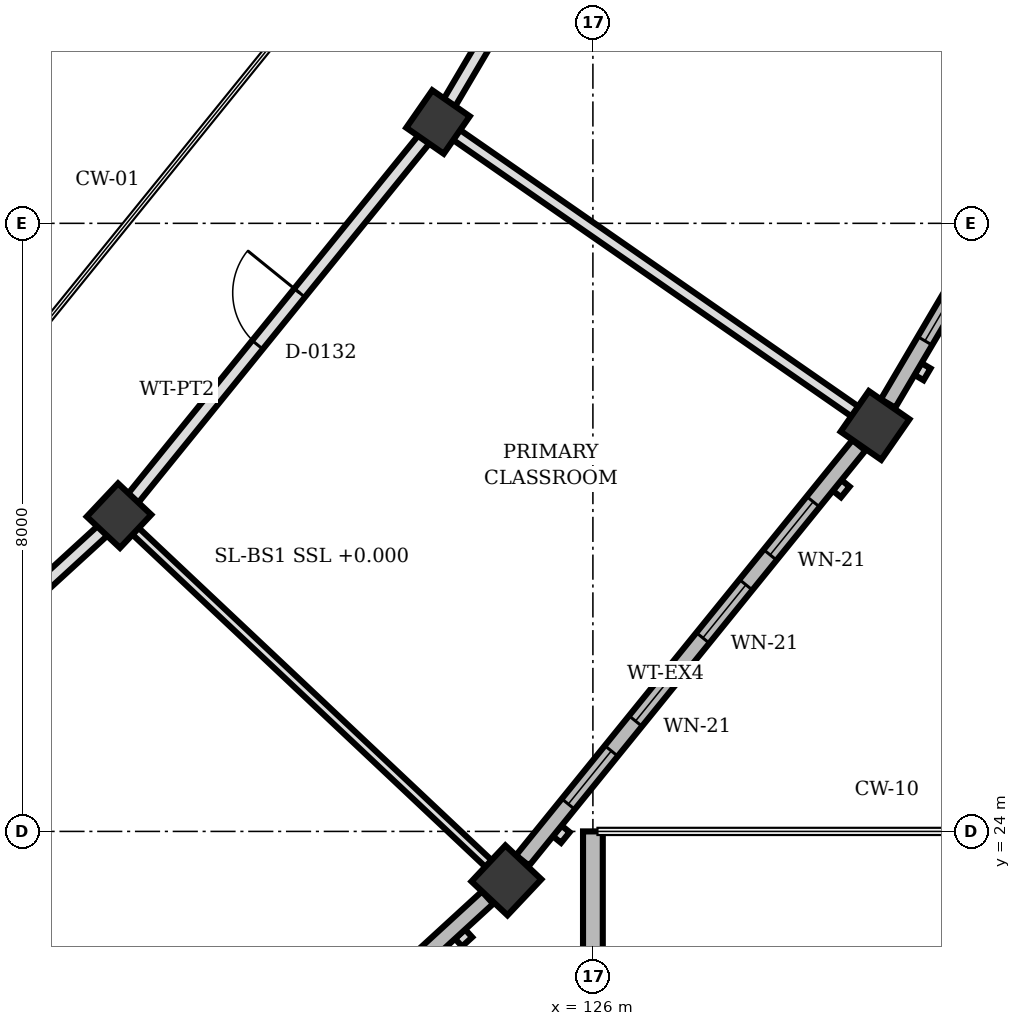
"""IFC4 building model, lengths in metres.
Left out: names, types, materials, properties, quantities, classifications, styles, units other than length and angle.
Written with IfcOpenShell. Run it as: python <this file> out.ifc"""

import sys

from ifc_helpers import new_model, si_unit, direction, frame, frame_2d, origin, origin_2d, place, context, subcontext, project, spatial, rectangle, extrude, element, fill, save


model = new_model("IFC4")
c1 = context("Model", 3, precision=1e-05, world=origin(), true_north=direction((0.0, 1.0)))
c2 = subcontext(c1, "Body", "Model", "MODEL_VIEW")
j1 = project(units=[si_unit("LENGTHUNIT", "METRE"), si_unit("PLANEANGLEUNIT", "RADIAN")], contexts=[c1])
p1 = place(None, origin())
s1 = spatial("IfcSite", under=j1, at=p1, CompositionType="ELEMENT")
p2 = place(p1, origin())
s2 = spatial("IfcBuilding", under=s1, at=p2, CompositionType="ELEMENT")
p3 = place(p2, origin())
s3 = spatial("IfcBuildingStorey", under=s2, at=p3, CompositionType="ELEMENT", Elevation=0.0)
for number, where, z_axis, x_axis in (
    (1, (119.765, 28.154, 0.0), (0.0, 0.0, 1.0), (0.728, -0.685, 0.0)),
    (2, (123.962, 33.333, 0.0), (0.0, 0.0, 1.0), (0.821, -0.57, 0.0)),
):
    element("IfcColumn", number, at=place(p3, frame(where, z_axis=z_axis, x_axis=x_axis)), inside=s3, PredefinedType="COLUMN", context=c2, shape_type="SweptSolid", body=[
        extrude(rectangle(XDim=0.6, YDim=0.6, at=origin_2d()), origin(), (0.0, 0.0, 1.0), 4.5),
    ])
for number, where, z_axis, x_axis in (
    (3, (124.862, 23.356, 0.0), (0.0, 0.0, 1.0), (0.728, -0.685, 0.0)),
    (4, (129.712, 29.341, 0.0), (0.0, 0.0, 1.0), (0.821, -0.57, 0.0)),
):
    element("IfcColumn", number, at=place(p3, frame(where, z_axis=z_axis, x_axis=x_axis)), inside=s3, PredefinedType="COLUMN", context=c2, shape_type="SweptSolid", body=[
        extrude(rectangle(XDim=0.65, YDim=0.65, at=origin_2d()), origin(), (0.0, 0.0, 1.0), 4.5),
    ])
p4 = place(p3, frame((124.614, 23.129, 0.0), z_axis=(0.0, 0.0, 1.0), x_axis=(-0.737497040912, -0.675350364364, 0.0)))
e5 = element("IfcWall", 5, at=p4, inside=s3, PredefinedType="SOLIDWALL", context=c2, shape_type="SweptSolid", body=[
    extrude(rectangle(XDim=7.032, YDim=0.22, at=frame_2d((3.516, 0.0))), origin(), (0.0, 0.0, 1.0), 3.55),
])
p5 = place(p4, frame((2.516, 0.0, 0.0)))
e6 = element("IfcOpeningElement", 6, at=p5, cuts=e5, PredefinedType="OPENING", context=c2, shape_type="SweptSolid", body=[
    extrude(rectangle(XDim=2.0, YDim=2.35, at=frame_2d((1.0, 1.175))), frame((0.0, 0.12, 0.0), z_axis=(0.0, -1.0, 0.0), x_axis=(1.0, 0.0, 0.0)), (0.0, 0.0, 1.0), 0.24),
])
p6 = place(p3, frame((129.5, 29.08, 0.0), z_axis=(0.0, 0.0, 1.0), x_axis=(-0.629497848331, -0.777002225831, 0.0)))
e7 = element("IfcWall", 7, at=p6, inside=s3, PredefinedType="SOLIDWALL", context=c2, shape_type="SweptSolid", body=[
    extrude(rectangle(XDim=7.031, YDim=0.22, at=frame_2d((3.516, 0.0))), origin(), (0.0, 0.0, 1.0), 3.55),
])
p7 = place(p6, frame((0.956, 0.0, 0.85)))
e8 = element("IfcOpeningElement", 8, at=p7, cuts=e7, PredefinedType="OPENING", context=c2, shape_type="SweptSolid", body=[
    extrude(rectangle(XDim=0.9, YDim=1.4, at=frame_2d((0.45, 0.7))), frame((0.0, 0.12, 0.0), z_axis=(0.0, -1.0, 0.0), x_axis=(1.0, 0.0, 0.0)), (0.0, 0.0, 1.0), 0.24),
])
p8 = place(p6, frame((2.362, 0.0, 0.85)))
e9 = element("IfcOpeningElement", 9, at=p8, cuts=e7, PredefinedType="OPENING", context=c2, shape_type="SweptSolid", body=[
    extrude(rectangle(XDim=0.9, YDim=1.4, at=frame_2d((0.45, 0.7))), frame((0.0, 0.12, 0.0), z_axis=(0.0, -1.0, 0.0), x_axis=(1.0, 0.0, 0.0)), (0.0, 0.0, 1.0), 0.24),
])
p9 = place(p6, frame((3.769, 0.0, 0.85)))
e10 = element("IfcOpeningElement", 10, at=p9, cuts=e7, PredefinedType="OPENING", context=c2, shape_type="SweptSolid", body=[
    extrude(rectangle(XDim=0.9, YDim=1.4, at=frame_2d((0.45, 0.7))), frame((0.0, 0.12, 0.0), z_axis=(0.0, -1.0, 0.0), x_axis=(1.0, 0.0, 0.0)), (0.0, 0.0, 1.0), 0.24),
])
p10 = place(p6, frame((5.175, 0.0, 0.85)))
e11 = element("IfcOpeningElement", 11, at=p10, cuts=e7, PredefinedType="OPENING", context=c2, shape_type="SweptSolid", body=[
    extrude(rectangle(XDim=0.9, YDim=1.4, at=frame_2d((0.45, 0.7))), frame((0.0, 0.12, 0.0), z_axis=(0.0, -1.0, 0.0), x_axis=(1.0, 0.0, 0.0)), (0.0, 0.0, 1.0), 0.24),
])
p11 = place(p3, frame((133.454, 35.688, 0.0), z_axis=(0.0, 0.0, 1.0), x_axis=(-0.50780734215, -0.861470663028, 0.0)))
e12 = element("IfcWall", 12, at=p11, inside=s3, PredefinedType="SOLIDWALL", context=c2, shape_type="SweptSolid", body=[
    extrude(rectangle(XDim=7.032, YDim=0.22, at=frame_2d((3.516, 0.0))), origin(), (0.0, 0.0, 1.0), 3.55),
])
p12 = place(p11, frame((0.956, 0.0, 0.85)))
e13 = element("IfcOpeningElement", 13, at=p12, cuts=e12, PredefinedType="OPENING", context=c2, shape_type="SweptSolid", body=[
    extrude(rectangle(XDim=0.9, YDim=1.4, at=frame_2d((0.45, 0.7))), frame((0.0, 0.12, 0.0), z_axis=(0.0, -1.0, 0.0), x_axis=(1.0, 0.0, 0.0)), (0.0, 0.0, 1.0), 0.24),
])
p13 = place(p11, frame((2.363, 0.0, 0.85)))
e14 = element("IfcOpeningElement", 14, at=p13, cuts=e12, PredefinedType="OPENING", context=c2, shape_type="SweptSolid", body=[
    extrude(rectangle(XDim=0.9, YDim=1.4, at=frame_2d((0.45, 0.7))), frame((0.0, 0.12, 0.0), z_axis=(0.0, -1.0, 0.0), x_axis=(1.0, 0.0, 0.0)), (0.0, 0.0, 1.0), 0.24),
])
p14 = place(p11, frame((3.769, 0.0, 0.85)))
e15 = element("IfcOpeningElement", 15, at=p14, cuts=e12, PredefinedType="OPENING", context=c2, shape_type="SweptSolid", body=[
    extrude(rectangle(XDim=0.9, YDim=1.4, at=frame_2d((0.45, 0.7))), frame((0.0, 0.12, 0.0), z_axis=(0.0, -1.0, 0.0), x_axis=(1.0, 0.0, 0.0)), (0.0, 0.0, 1.0), 0.24),
])
p15 = place(p11, frame((5.176, 0.0, 0.85)))
e16 = element("IfcOpeningElement", 16, at=p15, cuts=e12, PredefinedType="OPENING", context=c2, shape_type="SweptSolid", body=[
    extrude(rectangle(XDim=0.9, YDim=1.4, at=frame_2d((0.45, 0.7))), frame((0.0, 0.12, 0.0), z_axis=(0.0, -1.0, 0.0), x_axis=(1.0, 0.0, 0.0)), (0.0, 0.0, 1.0), 0.24),
])
p16 = place(p3, frame((126.0, 16.327, 0.0), z_axis=(0.0, 0.0, 1.0), x_axis=(0.0, 1.0, 0.0)))
e17 = element("IfcWall", 17, at=p16, inside=s3, PredefinedType="SOLIDWALL", context=c2, shape_type="SweptSolid", body=[
    extrude(rectangle(XDim=7.673, YDim=0.26, at=frame_2d((3.836, 0.0))), origin(), (0.0, 0.0, 1.0), 3.55),
])
p17 = place(p16, frame((3.286, 0.0, 0.9)))
e18 = element("IfcOpeningElement", 18, at=p17, cuts=e17, PredefinedType="OPENING", context=c2, shape_type="SweptSolid", body=[
    extrude(rectangle(XDim=1.1, YDim=1.1, at=frame_2d((0.55, 0.55))), frame((0.0, 0.14, 0.0), z_axis=(0.0, -1.0, 0.0), x_axis=(1.0, 0.0, 0.0)), (0.0, 0.0, 1.0), 0.28),
])
p18 = place(p3, frame((119.978, 27.954, 0.0), z_axis=(0.0, 0.0, 1.0), x_axis=(0.728064278851, -0.685508866362, 0.0)))
e19 = element("IfcWall", 19, at=p18, inside=s3, PredefinedType="PARTITIONING", context=c2, shape_type="SweptSolid", body=[
    extrude(rectangle(XDim=6.391, YDim=0.12, at=frame_2d((3.196, 0.0))), origin(), (0.0, 0.0, 1.0), 3.572),
])
p19 = place(p3, frame((124.202, 33.166, 0.0), z_axis=(0.0, 0.0, 1.0), x_axis=(0.821501195804, -0.570206791693, 0.0)))
e20 = element("IfcWall", 20, at=p19, inside=s3, PredefinedType="PARTITIONING", context=c2, shape_type="SweptSolid", body=[
    extrude(rectangle(XDim=6.391, YDim=0.16, at=frame_2d((3.195, 0.0))), origin(), (0.0, 0.0, 1.0), 3.572),
])
p20 = place(p3, frame((115.064, 23.85, 0.0), z_axis=(0.0, 0.0, 1.0), x_axis=(0.737595632739, 0.675242684199, 0.0)))
e21 = element("IfcWall", 21, at=p20, inside=s3, PredefinedType="PARTITIONING", context=c2, shape_type="SweptSolid", body=[
    extrude(rectangle(XDim=6.081, YDim=0.18, at=frame_2d((3.041, 0.0))), origin(), (0.0, 0.0, 1.0), 3.572),
])
p21 = place(p20, frame((2.39, 0.0, 0.0)))
e22 = element("IfcOpeningElement", 22, at=p21, cuts=e21, PredefinedType="OPENING", context=c2, shape_type="SweptSolid", body=[
    extrude(rectangle(XDim=1.3, YDim=2.28, at=frame_2d((0.65, 1.14))), frame((0.0, 0.1, 0.0), z_axis=(0.0, -1.0, 0.0), x_axis=(1.0, 0.0, 0.0)), (0.0, 0.0, 1.0), 0.2),
])
p22 = place(p3, frame((119.949, 28.381, 0.0), z_axis=(0.0, 0.0, 1.0), x_axis=(0.629617338729, 0.776905404005, 0.0)))
e23 = element("IfcWall", 23, at=p22, inside=s3, PredefinedType="PARTITIONING", context=c2, shape_type="SweptSolid", body=[
    extrude(rectangle(XDim=6.082, YDim=0.18, at=frame_2d((3.041, 0.0))), origin(), (0.0, 0.0, 1.0), 3.572),
])
p23 = place(p22, frame((2.601, 0.0, 0.0)))
e24 = element("IfcOpeningElement", 24, at=p23, cuts=e23, PredefinedType="OPENING", context=c2, shape_type="SweptSolid", body=[
    extrude(rectangle(XDim=0.88, YDim=2.1, at=frame_2d((0.44, 1.05))), frame((0.0, 0.1, 0.0), z_axis=(0.0, -1.0, 0.0), x_axis=(1.0, 0.0, 0.0)), (0.0, 0.0, 1.0), 0.2),
])
p24 = place(p3, frame((124.111, 33.585, 0.0), z_axis=(0.0, 0.0, 1.0), x_axis=(0.507886500356, 0.861423997086, 0.0)))
e25 = element("IfcWall", 25, at=p24, inside=s3, PredefinedType="PARTITIONING", context=c2, shape_type="SweptSolid", body=[
    extrude(rectangle(XDim=6.082, YDim=0.18, at=frame_2d((3.041, 0.0))), origin(), (0.0, 0.0, 1.0), 3.572),
])
p25 = place(p24, frame((2.541, 0.0, 0.0)))
e26 = element("IfcOpeningElement", 26, at=p25, cuts=e25, PredefinedType="OPENING", context=c2, shape_type="SweptSolid", body=[
    extrude(rectangle(XDim=1.0, YDim=2.1, at=frame_2d((0.5, 1.05))), frame((0.0, 0.1, 0.0), z_axis=(0.0, -1.0, 0.0), x_axis=(1.0, 0.0, 0.0)), (0.0, 0.0, 1.0), 0.2),
])
p26 = place(p7, origin())
e27 = element("IfcWindow", 27, at=p26, inside=s3, PartitioningType="SINGLE_PANEL", PredefinedType="WINDOW", context=c2, shape_type="SweptSolid", body=[
    extrude(rectangle(XDim=0.9, YDim=1.4, at=frame_2d((0.45, 0.7))), frame((0.0, 0.03, 0.0), z_axis=(0.0, -1.0, 0.0), x_axis=(1.0, 0.0, 0.0)), (0.0, 0.0, 1.0), 0.06),
])
fill(e8, e27)
p27 = place(p8, origin())
e28 = element("IfcWindow", 28, at=p27, inside=s3, PartitioningType="SINGLE_PANEL", PredefinedType="WINDOW", context=c2, shape_type="SweptSolid", body=[
    extrude(rectangle(XDim=0.9, YDim=1.4, at=frame_2d((0.45, 0.7))), frame((0.0, 0.03, 0.0), z_axis=(0.0, -1.0, 0.0), x_axis=(1.0, 0.0, 0.0)), (0.0, 0.0, 1.0), 0.06),
])
fill(e9, e28)
p28 = place(p9, origin())
e29 = element("IfcWindow", 29, at=p28, inside=s3, PartitioningType="SINGLE_PANEL", PredefinedType="WINDOW", context=c2, shape_type="SweptSolid", body=[
    extrude(rectangle(XDim=0.9, YDim=1.4, at=frame_2d((0.45, 0.7))), frame((0.0, 0.03, 0.0), z_axis=(0.0, -1.0, 0.0), x_axis=(1.0, 0.0, 0.0)), (0.0, 0.0, 1.0), 0.06),
])
fill(e10, e29)
p29 = place(p10, origin())
e30 = element("IfcWindow", 30, at=p29, inside=s3, PartitioningType="SINGLE_PANEL", PredefinedType="WINDOW", context=c2, shape_type="SweptSolid", body=[
    extrude(rectangle(XDim=0.9, YDim=1.4, at=frame_2d((0.45, 0.7))), frame((0.0, 0.03, 0.0), z_axis=(0.0, -1.0, 0.0), x_axis=(1.0, 0.0, 0.0)), (0.0, 0.0, 1.0), 0.06),
])
fill(e11, e30)
p30 = place(p15, origin())
e31 = element("IfcWindow", 31, at=p30, inside=s3, PartitioningType="SINGLE_PANEL", PredefinedType="WINDOW", context=c2, shape_type="SweptSolid", body=[
    extrude(rectangle(XDim=0.9, YDim=1.4, at=frame_2d((0.45, 0.7))), frame((0.0, 0.03, 0.0), z_axis=(0.0, -1.0, 0.0), x_axis=(1.0, 0.0, 0.0)), (0.0, 0.0, 1.0), 0.06),
])
fill(e16, e31)
p31 = place(p23, origin())
e32 = element("IfcDoor", 32, at=p31, inside=s3, OperationType="SINGLE_SWING_RIGHT", PredefinedType="DOOR", context=c2, shape_type="SweptSolid", body=[
    extrude(rectangle(XDim=0.88, YDim=2.1, at=frame_2d((0.44, 1.05))), frame((0.0, 0.025, 0.0), z_axis=(0.0, -1.0, 0.0), x_axis=(1.0, 0.0, 0.0)), (0.0, 0.0, 1.0), 0.05),
])
fill(e24, e32)
save(model, sys.argv[1])
